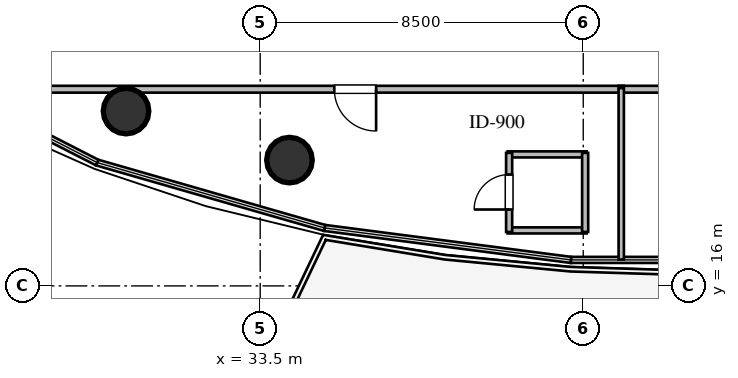
"""IFC4 building model, lengths in metres.
Left out: names, types, materials, properties, quantities, classifications, styles, units other than length and angle.
Written with IfcOpenShell. Run it as: python <this file> out.ifc"""

import sys

from ifc_helpers import new_model, si_unit, direction, frame, frame_2d, origin, origin_2d, place, context, subcontext, project, spatial, rectangle, circle, extrude, element, fill, save


model = new_model("IFC4")
c1 = context("Model", 3, precision=1e-05, world=origin(), true_north=direction((0.0, 1.0)))
c2 = subcontext(c1, "Body", "Model", "MODEL_VIEW")
j1 = project(units=[si_unit("LENGTHUNIT", "METRE"), si_unit("PLANEANGLEUNIT", "RADIAN")], contexts=[c1])
p1 = place(None, origin())
s1 = spatial("IfcSite", under=j1, at=p1, CompositionType="ELEMENT")
p2 = place(p1, origin())
s2 = spatial("IfcBuilding", under=s1, at=p2, CompositionType="ELEMENT")
p3 = place(p2, frame((0.0, 0.0, 120.6)))
s3 = spatial("IfcBuildingStorey", under=s2, at=p3, CompositionType="ELEMENT", Elevation=120.6)
for number, where, z_axis, x_axis in (
    (1, (29.97, 20.6, 0.0), (0.0, 0.0, 1.0), (1.0, 0.0, 0.0)),
    (2, (34.27, 19.31, 0.0), (0.0, 0.0, 1.0), (1.0, 0.0, 0.0)),
):
    element("IfcColumn", number, at=place(p3, frame(where, z_axis=z_axis, x_axis=x_axis)), inside=s3, PredefinedType="COLUMN", context=c2, shape_type="SweptSolid", body=[
        extrude(circle(Radius=0.6, at=origin_2d()), origin(), (0.0, 0.0, 1.0), 3.6),
    ])
for number, where, z_axis, x_axis in (
    (3, (40.01, 17.46, 0.0), (0.0, 0.0, 1.0), (1.0, 0.0, 0.0)),
    (4, (40.01, 19.46, 0.0), (0.0, 0.0, 1.0), (1.0, 0.0, 0.0)),
):
    element("IfcWall", number, at=place(p3, frame(where, z_axis=z_axis, x_axis=x_axis)), inside=s3, PredefinedType="PLUMBINGWALL", context=c2, shape_type="SweptSolid", body=[
        extrude(rectangle(XDim=2.08, YDim=0.16, at=frame_2d((1.04, 0.0))), origin(), (0.0, 0.0, 1.0), 3.36),
    ])
p4 = place(p3, frame((40.05, 17.42, 0.0), z_axis=(0.0, 0.0, 1.0), x_axis=(0.0, 1.0, 0.0)))
e5 = element("IfcWall", 5, at=p4, inside=s3, PredefinedType="PLUMBINGWALL", context=c2, shape_type="SweptSolid", body=[
    extrude(rectangle(XDim=2.08, YDim=0.16, at=frame_2d((1.04, 0.0))), origin(), (0.0, 0.0, 1.0), 3.36),
])
p5 = place(p4, frame((0.59, 0.0, 0.0)))
e6 = element("IfcOpeningElement", 6, at=p5, cuts=e5, PredefinedType="OPENING", context=c2, shape_type="SweptSolid", body=[
    extrude(rectangle(XDim=0.92, YDim=2.1, at=frame_2d((0.46, 1.05))), frame((0.0, 0.09, 0.0), z_axis=(0.0, -1.0, 0.0), x_axis=(1.0, 0.0, 0.0)), (0.0, 0.0, 1.0), 0.18),
])
p6 = place(p3, frame((42.05, 17.42, 0.0), z_axis=(0.0, 0.0, 1.0), x_axis=(0.0, 1.0, 0.0)))
e7 = element("IfcWall", 7, at=p6, inside=s3, PredefinedType="PLUMBINGWALL", context=c2, shape_type="SweptSolid", body=[
    extrude(rectangle(XDim=2.08, YDim=0.16, at=frame_2d((1.04, 0.0))), origin(), (0.0, 0.0, 1.0), 3.36),
])
p7 = place(p3, frame((43.065, 21.175, 0.0), z_axis=(0.0, 0.0, 1.0), x_axis=(-1.0, 0.0, 0.0)))
e8 = element("IfcWall", 8, at=p7, inside=s3, PredefinedType="PARTITIONING", context=c2, shape_type="SweptSolid", body=[
    extrude(rectangle(XDim=17.614, YDim=0.18, at=frame_2d((8.807, 0.0))), origin(), (0.0, 0.0, 1.0), 2.657),
])
p8 = place(p7, frame((6.515, 0.0, 0.0)))
e9 = element("IfcOpeningElement", 9, at=p8, cuts=e8, PredefinedType="OPENING", context=c2, shape_type="SweptSolid", body=[
    extrude(rectangle(XDim=1.1, YDim=2.1, at=frame_2d((0.55, 1.05))), frame((0.0, 0.1, 0.0), z_axis=(0.0, -1.0, 0.0), x_axis=(1.0, 0.0, 0.0)), (0.0, 0.0, 1.0), 0.2),
])
p9 = place(p3, frame((46.455, 21.175, 0.0), z_axis=(0.0, 0.0, 1.0), x_axis=(-1.0, 0.0, 0.0)))
e10 = element("IfcWall", 10, at=p9, inside=s3, PredefinedType="PARTITIONING", context=c2, shape_type="SweptSolid", body=[
    extrude(rectangle(XDim=3.52, YDim=0.18, at=frame_2d((1.76, 0.0))), origin(), (0.0, 0.0, 1.0), 2.996),
])
p10 = place(p9, frame((1.21, 0.0, 0.0)))
e11 = element("IfcOpeningElement", 11, at=p10, cuts=e10, PredefinedType="OPENING", context=c2, shape_type="SweptSolid", body=[
    extrude(rectangle(XDim=1.1, YDim=2.1, at=frame_2d((0.55, 1.05))), frame((0.0, 0.1, 0.0), z_axis=(0.0, -1.0, 0.0), x_axis=(1.0, 0.0, 0.0)), (0.0, 0.0, 1.0), 0.2),
])
p11 = place(p3, frame((43.0, 21.205, 0.0), z_axis=(0.0, 0.0, 1.0), x_axis=(0.0, -1.0, 0.0)))
e12 = element("IfcWall", 12, at=p11, inside=s3, PredefinedType="PARTITIONING", context=c2, shape_type="SweptSolid", body=[
    extrude(rectangle(XDim=4.511, YDim=0.14, at=frame_2d((2.255, 0.0))), origin(), (0.0, 0.0, 1.0), 3.36),
])
p12 = place(p5, origin())
e13 = element("IfcDoor", 13, at=p12, inside=s3, OperationType="SINGLE_SWING_LEFT", PredefinedType="DOOR", context=c2, shape_type="SweptSolid", body=[
    extrude(rectangle(XDim=0.92, YDim=2.1, at=frame_2d((0.46, 1.05))), frame((0.0, 0.025, 0.0), z_axis=(0.0, -1.0, 0.0), x_axis=(1.0, 0.0, 0.0)), (0.0, 0.0, 1.0), 0.05),
])
fill(e6, e13)
p13 = place(p8, origin())
e14 = element("IfcDoor", 14, at=p13, inside=s3, OperationType="SINGLE_SWING_LEFT", PredefinedType="DOOR", context=c2, shape_type="SweptSolid", body=[
    extrude(rectangle(XDim=1.1, YDim=2.1, at=frame_2d((0.55, 1.05))), frame((0.0, 0.025, 0.0), z_axis=(0.0, -1.0, 0.0), x_axis=(1.0, 0.0, 0.0)), (0.0, 0.0, 1.0), 0.05),
])
fill(e9, e14)
save(model, sys.argv[1])
